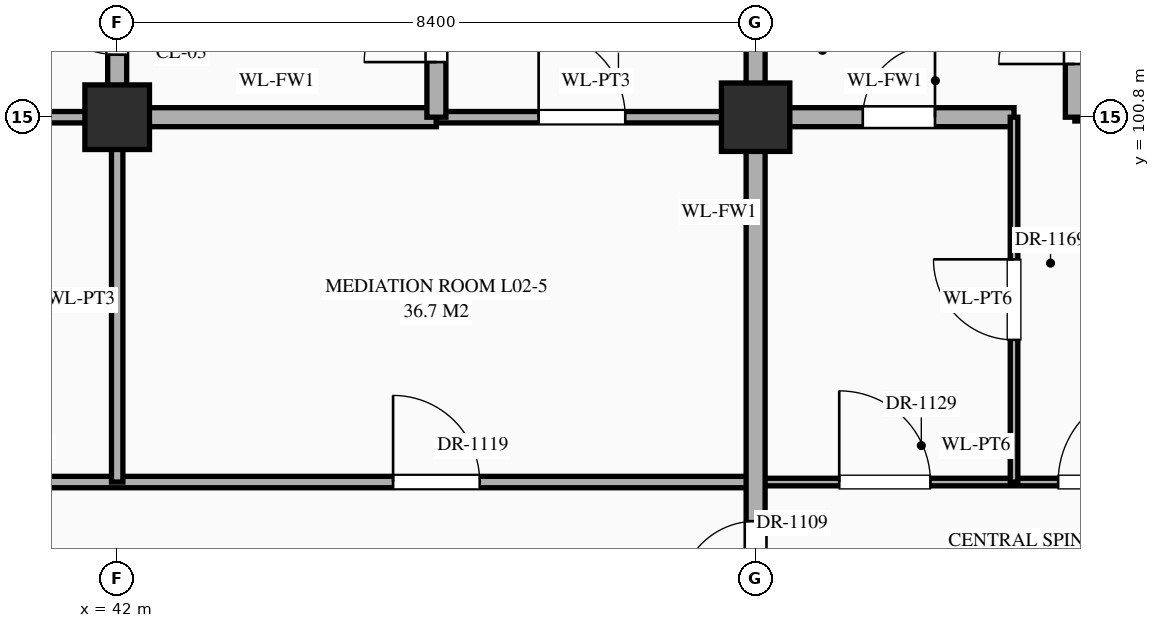
"""IFC4 building model, lengths in metres.
Left out: names, types, materials, properties, quantities, classifications, styles, units other than length and angle.
Written with IfcOpenShell. Run it as: python <this file> out.ifc"""

import sys

from ifc_helpers import new_model, si_unit, direction, frame, frame_2d, origin, origin_2d, place, context, subcontext, project, spatial, rectangle, extrude, element, fill, save


model = new_model("IFC4")
c1 = context("Model", 3, precision=1e-05, world=origin(), true_north=direction((0.0, 1.0)))
c2 = subcontext(c1, "Body", "Model", "MODEL_VIEW")
j1 = project(units=[si_unit("LENGTHUNIT", "METRE"), si_unit("PLANEANGLEUNIT", "RADIAN")], contexts=[c1])
p1 = place(None, origin())
s1 = spatial("IfcSite", under=j1, at=p1, CompositionType="ELEMENT")
p2 = place(p1, origin())
s2 = spatial("IfcBuilding", under=s1, at=p2, CompositionType="ELEMENT")
p3 = place(p2, frame((0.0, 0.0, 5.4)))
s3 = spatial("IfcBuildingStorey", under=s2, at=p3, CompositionType="ELEMENT", Elevation=5.4)
p4 = place(p3, frame((42.0, 100.8, 0.0), z_axis=(0.0, 0.0, 1.0), x_axis=(1.0, 0.0, 0.0)))
e1 = element("IfcColumn", 1, at=p4, inside=s3, PredefinedType="COLUMN", context=c2, shape_type="SweptSolid", body=[
    extrude(rectangle(XDim=0.85, YDim=0.85, at=origin_2d()), origin(), (0.0, 0.0, 1.0), 5.4),
])
p5 = place(p3, frame((50.4, 100.8, 0.0), z_axis=(0.0, 0.0, 1.0), x_axis=(1.0, 0.0, 0.0)))
e2 = element("IfcColumn", 2, at=p5, inside=s3, PredefinedType="COLUMN", context=c2, shape_type="SweptSolid", body=[
    extrude(rectangle(XDim=0.9, YDim=0.9, at=origin_2d()), origin(), (0.0, 0.0, 1.0), 5.4),
])
p6 = place(p3, frame((31.0, 96.0, 0.0), z_axis=(0.0, 0.0, 1.0), x_axis=(1.0, 0.0, 0.0)))
e3 = element("IfcWall", 3, at=p6, inside=s3, PredefinedType="STANDARD", context=c2, shape_type="SweptSolid", body=[
    extrude(rectangle(XDim=19.4, YDim=0.15, at=frame_2d((9.7, 0.0))), origin(), (0.0, 0.0, 1.0), 5.12),
])
p7 = place(p6, frame((0.79, 0.0, 0.0)))
e4 = element("IfcOpeningElement", 4, at=p7, cuts=e3, PredefinedType="OPENING", context=c2, shape_type="SweptSolid", body=[
    extrude(rectangle(XDim=1.02, YDim=2.4, at=frame_2d((0.51, 1.2))), frame((0.0, 0.087, 0.0), z_axis=(0.0, -1.0, 0.0), x_axis=(1.0, 0.0, 0.0)), (0.0, 0.0, 1.0), 0.174),
])
p8 = place(p6, frame((6.27, 0.0, 0.0)))
e5 = element("IfcOpeningElement", 5, at=p8, cuts=e3, PredefinedType="OPENING", context=c2, shape_type="SweptSolid", body=[
    extrude(rectangle(XDim=1.06, YDim=2.4, at=frame_2d((0.53, 1.2))), frame((0.0, 0.087, 0.0), z_axis=(0.0, -1.0, 0.0), x_axis=(1.0, 0.0, 0.0)), (0.0, 0.0, 1.0), 0.174),
])
p9 = place(p6, frame((14.63, 0.0, 0.0)))
e6 = element("IfcOpeningElement", 6, at=p9, cuts=e3, PredefinedType="OPENING", context=c2, shape_type="SweptSolid", body=[
    extrude(rectangle(XDim=1.14, YDim=2.4, at=frame_2d((0.57, 1.2))), frame((0.0, 0.087, 0.0), z_axis=(0.0, -1.0, 0.0), x_axis=(1.0, 0.0, 0.0)), (0.0, 0.0, 1.0), 0.174),
])
p10 = place(p3, frame((50.4, 96.0, 0.0), z_axis=(0.0, 0.0, 1.0), x_axis=(1.0, 0.0, 0.0)))
e7 = element("IfcWall", 7, at=p10, inside=s3, PredefinedType="STANDARD", context=c2, shape_type="SweptSolid", body=[
    extrude(rectangle(XDim=5.8, YDim=0.1, at=frame_2d((2.9, 0.0))), origin(), (0.0, 0.0, 1.0), 5.12),
])
p11 = place(p10, frame((1.1, 0.0, 0.0)))
e8 = element("IfcOpeningElement", 8, at=p11, cuts=e7, PredefinedType="OPENING", context=c2, shape_type="SweptSolid", body=[
    extrude(rectangle(XDim=1.2, YDim=2.35, at=frame_2d((0.6, 1.175))), frame((0.0, 0.062, 0.0), z_axis=(0.0, -1.0, 0.0), x_axis=(1.0, 0.0, 0.0)), (0.0, 0.0, 1.0), 0.124),
])
p12 = place(p10, frame((3.98, 0.0, 0.0)))
e9 = element("IfcOpeningElement", 9, at=p12, cuts=e7, PredefinedType="OPENING", context=c2, shape_type="SweptSolid", body=[
    extrude(rectangle(XDim=1.24, YDim=2.3, at=frame_2d((0.62, 1.15))), frame((0.0, 0.062, 0.0), z_axis=(0.0, -1.0, 0.0), x_axis=(1.0, 0.0, 0.0)), (0.0, 0.0, 1.0), 0.124),
])
p13 = place(p3, frame((31.0, 100.8, 0.0), z_axis=(0.0, 0.0, 1.0), x_axis=(1.0, 0.0, 0.0)))
e10 = element("IfcWall", 10, at=p13, inside=s3, PredefinedType="STANDARD", context=c2, shape_type="SweptSolid", body=[
    extrude(rectangle(XDim=11.0, YDim=0.15, at=frame_2d((5.5, 0.0))), origin(), (0.0, 0.0, 1.0), 4.27),
])
p14 = place(p13, frame((0.667, 0.0, 0.0)))
e11 = element("IfcOpeningElement", 11, at=p14, cuts=e10, PredefinedType="OPENING", context=c2, shape_type="SweptSolid", body=[
    extrude(rectangle(XDim=0.92, YDim=2.15, at=frame_2d((0.46, 1.075))), frame((0.0, 0.087, 0.0), z_axis=(0.0, -1.0, 0.0), x_axis=(1.0, 0.0, 0.0)), (0.0, 0.0, 1.0), 0.174),
])
p15 = place(p13, frame((6.32, 0.0, 0.0)))
e12 = element("IfcOpeningElement", 12, at=p15, cuts=e10, PredefinedType="OPENING", context=c2, shape_type="SweptSolid", body=[
    extrude(rectangle(XDim=0.96, YDim=2.2, at=frame_2d((0.48, 1.1))), frame((0.0, 0.087, 0.0), z_axis=(0.0, -1.0, 0.0), x_axis=(1.0, 0.0, 0.0)), (0.0, 0.0, 1.0), 0.174),
])
p16 = place(p3, frame((42.0, 100.8, 0.0), z_axis=(0.0, 0.0, 1.0), x_axis=(1.0, 0.0, 0.0)))
e13 = element("IfcWall", 13, at=p16, inside=s3, PredefinedType="STANDARD", context=c2, shape_type="SweptSolid", body=[
    extrude(rectangle(XDim=4.2, YDim=0.25, at=frame_2d((2.1, 0.0))), origin(), (0.0, 0.0, 1.0), 4.27),
])
p17 = place(p3, frame((46.2, 100.8, 0.0), z_axis=(0.0, 0.0, 1.0), x_axis=(1.0, 0.0, 0.0)))
e14 = element("IfcWall", 14, at=p17, inside=s3, PredefinedType="STANDARD", context=c2, shape_type="SweptSolid", body=[
    extrude(rectangle(XDim=4.2, YDim=0.15, at=frame_2d((2.1, 0.0))), origin(), (0.0, 0.0, 1.0), 4.27),
])
p18 = place(p17, frame((1.345, 0.0, 0.0)))
e15 = element("IfcOpeningElement", 15, at=p18, cuts=e14, PredefinedType="OPENING", context=c2, shape_type="SweptSolid", body=[
    extrude(rectangle(XDim=1.14, YDim=2.4, at=frame_2d((0.57, 1.2))), frame((0.0, 0.087, 0.0), z_axis=(0.0, -1.0, 0.0), x_axis=(1.0, 0.0, 0.0)), (0.0, 0.0, 1.0), 0.174),
])
p19 = place(p3, frame((50.4, 100.8, 0.0), z_axis=(0.0, 0.0, 1.0), x_axis=(1.0, 0.0, 0.0)))
e16 = element("IfcWall", 16, at=p19, inside=s3, PredefinedType="STANDARD", context=c2, shape_type="SweptSolid", body=[
    extrude(rectangle(XDim=3.4, YDim=0.25, at=frame_2d((1.7, 0.0))), origin(), (0.0, 0.0, 1.0), 4.27),
])
p20 = place(p19, frame((1.41, 0.0, 0.0)))
e17 = element("IfcOpeningElement", 17, at=p20, cuts=e16, PredefinedType="OPENING", context=c2, shape_type="SweptSolid", body=[
    extrude(rectangle(XDim=0.95, YDim=2.15, at=frame_2d((0.475, 1.075))), frame((0.0, 0.137, 0.0), z_axis=(0.0, -1.0, 0.0), x_axis=(1.0, 0.0, 0.0)), (0.0, 0.0, 1.0), 0.274),
])
p21 = place(p3, frame((54.6, 100.8, 0.0), z_axis=(0.0, 0.0, 1.0), x_axis=(1.0, 0.0, 0.0)))
e18 = element("IfcWall", 18, at=p21, inside=s3, PredefinedType="STANDARD", context=c2, shape_type="SweptSolid", body=[
    extrude(rectangle(XDim=1.6, YDim=0.1, at=frame_2d((0.8, 0.0))), origin(), (0.0, 0.0, 1.0), 4.27),
])
p22 = place(p21, frame((0.27, 0.0, 0.0)))
e19 = element("IfcOpeningElement", 19, at=p22, cuts=e18, PredefinedType="OPENING", context=c2, shape_type="SweptSolid", body=[
    extrude(rectangle(XDim=1.06, YDim=2.4, at=frame_2d((0.53, 1.2))), frame((0.0, 0.062, 0.0), z_axis=(0.0, -1.0, 0.0), x_axis=(1.0, 0.0, 0.0)), (0.0, 0.0, 1.0), 0.124),
])
p23 = place(p3, frame((42.0, 96.0, 0.0), z_axis=(0.0, 0.0, 1.0), x_axis=(0.0, 1.0, 0.0)))
e20 = element("IfcWall", 20, at=p23, inside=s3, PredefinedType="STANDARD", context=c2, shape_type="SweptSolid", body=[
    extrude(rectangle(XDim=4.8, YDim=0.15, at=frame_2d((2.4, 0.0))), origin(), (0.0, 0.0, 1.0), 4.37),
])
p24 = place(p3, frame((42.0, 100.8, 0.0), z_axis=(0.0, 0.0, 1.0), x_axis=(0.0, 1.0, 0.0)))
e21 = element("IfcWall", 21, at=p24, inside=s3, PredefinedType="STANDARD", context=c2, shape_type="SweptSolid", body=[
    extrude(rectangle(XDim=3.6, YDim=0.25, at=frame_2d((1.8, 0.0))), origin(), (0.0, 0.0, 1.0), 4.37),
])
p25 = place(p24, frame((0.823, 0.0, 0.0)))
e22 = element("IfcOpeningElement", 22, at=p25, cuts=e21, PredefinedType="OPENING", context=c2, shape_type="SweptSolid", body=[
    extrude(rectangle(XDim=1.1, YDim=2.2, at=frame_2d((0.55, 1.1))), frame((0.0, 0.137, 0.0), z_axis=(0.0, -1.0, 0.0), x_axis=(1.0, 0.0, 0.0)), (0.0, 0.0, 1.0), 0.274),
])
p26 = place(p3, frame((46.2, 100.8, 0.0), z_axis=(0.0, 0.0, 1.0), x_axis=(0.0, 1.0, 0.0)))
e23 = element("IfcWall", 23, at=p26, inside=s3, PredefinedType="STANDARD", context=c2, shape_type="SweptSolid", body=[
    extrude(rectangle(XDim=3.6, YDim=0.25, at=frame_2d((1.8, 0.0))), origin(), (0.0, 0.0, 1.0), 4.72),
])
p27 = place(p26, frame((0.725, 0.0, 0.0)))
e24 = element("IfcOpeningElement", 24, at=p27, cuts=e23, PredefinedType="OPENING", context=c2, shape_type="SweptSolid", body=[
    extrude(rectangle(XDim=0.95, YDim=2.15, at=frame_2d((0.475, 1.075))), frame((0.0, 0.137, 0.0), z_axis=(0.0, -1.0, 0.0), x_axis=(1.0, 0.0, 0.0)), (0.0, 0.0, 1.0), 0.274),
])
p28 = place(p3, frame((50.4, 91.2, 0.0), z_axis=(0.0, 0.0, 1.0), x_axis=(0.0, 1.0, 0.0)))
e25 = element("IfcWall", 25, at=p28, inside=s3, PredefinedType="STANDARD", context=c2, shape_type="SweptSolid", body=[
    extrude(rectangle(XDim=13.2, YDim=0.25, at=frame_2d((6.6, 0.0))), origin(), (0.0, 0.0, 1.0), 4.37),
])
p29 = place(p28, frame((0.54, 0.0, 0.0)))
e26 = element("IfcOpeningElement", 26, at=p29, cuts=e25, PredefinedType="OPENING", context=c2, shape_type="SweptSolid", body=[
    extrude(rectangle(XDim=0.95, YDim=2.15, at=frame_2d((0.475, 1.075))), frame((0.0, 0.137, 0.0), z_axis=(0.0, -1.0, 0.0), x_axis=(1.0, 0.0, 0.0)), (0.0, 0.0, 1.0), 0.274),
])
p30 = place(p28, frame((10.51, 0.0, 0.0)))
e27 = element("IfcOpeningElement", 27, at=p30, cuts=e25, PredefinedType="OPENING", context=c2, shape_type="SweptSolid", body=[
    extrude(rectangle(XDim=0.95, YDim=2.15, at=frame_2d((0.475, 1.075))), frame((0.0, 0.137, 0.0), z_axis=(0.0, -1.0, 0.0), x_axis=(1.0, 0.0, 0.0)), (0.0, 0.0, 1.0), 0.274),
])
p31 = place(p28, frame((3.285, 0.0, 0.0)))
e28 = element("IfcOpeningElement", 28, at=p31, cuts=e25, PredefinedType="OPENING", context=c2, shape_type="SweptSolid", body=[
    extrude(rectangle(XDim=1.0, YDim=2.2, at=frame_2d((0.5, 1.1))), frame((0.0, 0.137, 0.0), z_axis=(0.0, -1.0, 0.0), x_axis=(1.0, 0.0, 0.0)), (0.0, 0.0, 1.0), 0.274),
])
p32 = place(p3, frame((53.8, 96.0, 0.0), z_axis=(0.0, 0.0, 1.0), x_axis=(0.0, 1.0, 0.0)))
e29 = element("IfcWall", 29, at=p32, inside=s3, PredefinedType="STANDARD", context=c2, shape_type="SweptSolid", body=[
    extrude(rectangle(XDim=4.8, YDim=0.1, at=frame_2d((2.4, 0.0))), origin(), (0.0, 0.0, 1.0), 5.12),
])
p33 = place(p32, frame((1.87, 0.0, 0.0)))
e30 = element("IfcOpeningElement", 30, at=p33, cuts=e29, PredefinedType="OPENING", context=c2, shape_type="SweptSolid", body=[
    extrude(rectangle(XDim=1.06, YDim=2.4, at=frame_2d((0.53, 1.2))), frame((0.0, 0.062, 0.0), z_axis=(0.0, -1.0, 0.0), x_axis=(1.0, 0.0, 0.0)), (0.0, 0.0, 1.0), 0.124),
])
p34 = place(p3, frame((54.6, 100.8, 0.0), z_axis=(0.0, 0.0, 1.0), x_axis=(0.0, 1.0, 0.0)))
e31 = element("IfcWall", 31, at=p34, inside=s3, PredefinedType="STANDARD", context=c2, shape_type="SweptSolid", body=[
    extrude(rectangle(XDim=3.6, YDim=0.25, at=frame_2d((1.8, 0.0))), origin(), (0.0, 0.0, 1.0), 4.57),
])
p35 = place(p34, frame((0.7, 0.0, 0.0)))
e32 = element("IfcOpeningElement", 32, at=p35, cuts=e31, PredefinedType="OPENING", context=c2, shape_type="SweptSolid", body=[
    extrude(rectangle(XDim=1.0, YDim=2.2, at=frame_2d((0.5, 1.1))), frame((0.0, 0.137, 0.0), z_axis=(0.0, -1.0, 0.0), x_axis=(1.0, 0.0, 0.0)), (0.0, 0.0, 1.0), 0.274),
])
p36 = place(p27, origin())
e33 = element("IfcDoor", 33, at=p36, inside=s3, OperationType="SINGLE_SWING_LEFT", PredefinedType="DOOR", context=c2, shape_type="SweptSolid", body=[
    extrude(rectangle(XDim=0.95, YDim=2.15, at=frame_2d((0.475, 1.075))), frame((0.0, 0.025, 0.0), z_axis=(0.0, -1.0, 0.0), x_axis=(1.0, 0.0, 0.0)), (0.0, 0.0, 1.0), 0.05),
])
fill(e24, e33)
p37 = place(p25, origin())
e34 = element("IfcDoor", 34, at=p37, inside=s3, OperationType="SINGLE_SWING_RIGHT", PredefinedType="DOOR", context=c2, shape_type="SweptSolid", body=[
    extrude(rectangle(XDim=1.1, YDim=2.2, at=frame_2d((0.55, 1.1))), frame((0.0, 0.025, 0.0), z_axis=(0.0, -1.0, 0.0), x_axis=(1.0, 0.0, 0.0)), (0.0, 0.0, 1.0), 0.05),
])
fill(e22, e34)
p38 = place(p18, origin())
e35 = element("IfcDoor", 35, at=p38, inside=s3, OperationType="SINGLE_SWING_LEFT", PredefinedType="DOOR", context=c2, shape_type="SweptSolid", body=[
    extrude(rectangle(XDim=1.14, YDim=2.4, at=frame_2d((0.57, 1.2))), frame((0.0, 0.025, 0.0), z_axis=(0.0, -1.0, 0.0), x_axis=(1.0, 0.0, 0.0)), (0.0, 0.0, 1.0), 0.05),
])
fill(e15, e35)
p39 = place(p35, origin())
e36 = element("IfcDoor", 36, at=p39, inside=s3, OperationType="SINGLE_SWING_LEFT", PredefinedType="DOOR", context=c2, shape_type="SweptSolid", body=[
    extrude(rectangle(XDim=1.0, YDim=2.2, at=frame_2d((0.5, 1.1))), frame((0.0, 0.025, 0.0), z_axis=(0.0, -1.0, 0.0), x_axis=(1.0, 0.0, 0.0)), (0.0, 0.0, 1.0), 0.05),
])
fill(e32, e36)
p40 = place(p20, origin())
e37 = element("IfcDoor", 37, at=p40, inside=s3, OperationType="SINGLE_SWING_RIGHT", PredefinedType="DOOR", context=c2, shape_type="SweptSolid", body=[
    extrude(rectangle(XDim=0.95, YDim=2.15, at=frame_2d((0.475, 1.075))), frame((0.0, 0.025, 0.0), z_axis=(0.0, -1.0, 0.0), x_axis=(1.0, 0.0, 0.0)), (0.0, 0.0, 1.0), 0.05),
])
fill(e17, e37)
p41 = place(p31, origin())
e38 = element("IfcDoor", 38, at=p41, inside=s3, OperationType="SINGLE_SWING_LEFT", PredefinedType="DOOR", context=c2, shape_type="SweptSolid", body=[
    extrude(rectangle(XDim=1.0, YDim=2.2, at=frame_2d((0.5, 1.1))), frame((0.0, 0.025, 0.0), z_axis=(0.0, -1.0, 0.0), x_axis=(1.0, 0.0, 0.0)), (0.0, 0.0, 1.0), 0.05),
])
fill(e28, e38)
p42 = place(p9, origin())
e39 = element("IfcDoor", 39, at=p42, inside=s3, OperationType="SINGLE_SWING_LEFT", PredefinedType="DOOR", context=c2, shape_type="SweptSolid", body=[
    extrude(rectangle(XDim=1.14, YDim=2.4, at=frame_2d((0.57, 1.2))), frame((0.0, 0.025, 0.0), z_axis=(0.0, -1.0, 0.0), x_axis=(1.0, 0.0, 0.0)), (0.0, 0.0, 1.0), 0.05),
])
fill(e6, e39)
p43 = place(p11, origin())
e40 = element("IfcDoor", 40, at=p43, inside=s3, OperationType="SINGLE_SWING_LEFT", PredefinedType="DOOR", context=c2, shape_type="SweptSolid", body=[
    extrude(rectangle(XDim=1.2, YDim=2.35, at=frame_2d((0.6, 1.175))), frame((0.0, 0.025, 0.0), z_axis=(0.0, -1.0, 0.0), x_axis=(1.0, 0.0, 0.0)), (0.0, 0.0, 1.0), 0.05),
])
fill(e8, e40)
p44 = place(p12, origin())
e41 = element("IfcDoor", 41, at=p44, inside=s3, OperationType="SINGLE_SWING_RIGHT", PredefinedType="DOOR", context=c2, shape_type="SweptSolid", body=[
    extrude(rectangle(XDim=1.24, YDim=2.3, at=frame_2d((0.62, 1.15))), frame((0.0, 0.025, 0.0), z_axis=(0.0, -1.0, 0.0), x_axis=(1.0, 0.0, 0.0)), (0.0, 0.0, 1.0), 0.05),
])
fill(e9, e41)
p45 = place(p33, origin())
e42 = element("IfcDoor", 42, at=p45, inside=s3, OperationType="SINGLE_SWING_RIGHT", PredefinedType="DOOR", context=c2, shape_type="SweptSolid", body=[
    extrude(rectangle(XDim=1.06, YDim=2.4, at=frame_2d((0.53, 1.2))), frame((0.0, 0.025, 0.0), z_axis=(0.0, -1.0, 0.0), x_axis=(1.0, 0.0, 0.0)), (0.0, 0.0, 1.0), 0.05),
])
fill(e30, e42)
save(model, sys.argv[1])
